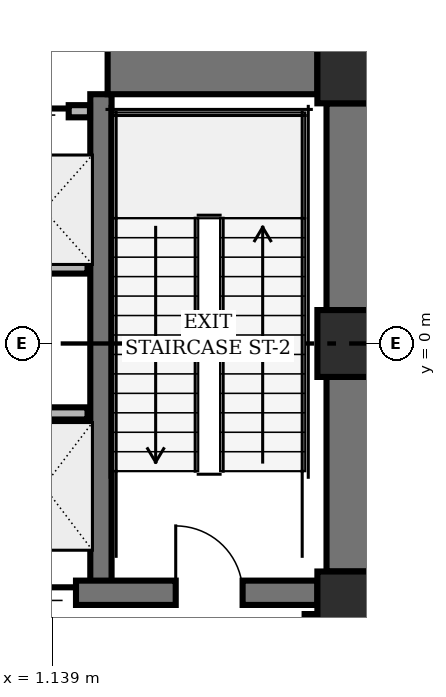
"""IFC4 building model, lengths in metres.
Left out: names, types, materials, properties, quantities, classifications, styles, units other than length and angle.
Written with IfcOpenShell. Run it as: python <this file> out.ifc"""

import sys

from ifc_helpers import new_model, si_unit, direction, frame, frame_2d, origin, origin_2d, place, context, subcontext, project, spatial, rectangle, hollow_rectangle, extrude, element, fill, save


model = new_model("IFC4")
c1 = context("Model", 3, precision=1e-05, world=origin(), true_north=direction((0.0, 1.0)))
c2 = subcontext(c1, "Body", "Model", "MODEL_VIEW")
j1 = project(units=[si_unit("LENGTHUNIT", "METRE"), si_unit("PLANEANGLEUNIT", "RADIAN")], contexts=[c1])
p1 = place(None, origin())
s1 = spatial("IfcSite", under=j1, at=p1, CompositionType="ELEMENT")
p2 = place(p1, origin())
s2 = spatial("IfcBuilding", under=s1, at=p2, CompositionType="ELEMENT")
p3 = place(p2, origin())
s3 = spatial("IfcBuildingStorey", under=s2, at=p3, CompositionType="ELEMENT", Elevation=0.0)
for number, where, z_axis, x_axis in (
    (1, (6.05, 4.5, 0.0), (0.0, 0.0, 1.0), (1.0, 0.0, 0.0)),
    (2, (6.05, 0.0, 0.0), (0.0, 0.0, 1.0), (1.0, 0.0, 0.0)),
    (3, (6.05, -4.3, 0.0), (0.0, 0.0, 1.0), (1.0, 0.0, 0.0)),
):
    element("IfcColumn", number, at=place(p3, frame(where, z_axis=z_axis, x_axis=x_axis)), inside=s3, PredefinedType="COLUMN", context=c2, shape_type="SweptSolid", body=[
        extrude(hollow_rectangle(XDim=1.1, YDim=1.1, WallThickness=0.07, InnerFilletRadius=0.02, OuterFilletRadius=0.04, at=origin_2d()), origin(), (0.0, 0.0, 1.0), 4.8),
    ])
p4 = place(p3, frame((6.05, 0.55, 0.0), z_axis=(0.0, 0.0, 1.0), x_axis=(0.0, 1.0, 0.0)))
e4 = element("IfcWall", 4, at=p4, inside=s3, PredefinedType="SHEAR", context=c2, shape_type="SweptSolid", body=[
    extrude(rectangle(XDim=3.4, YDim=0.8, at=frame_2d((1.7, 0.0))), origin(), (0.0, 0.0, 1.0), 4.498),
])
p5 = place(p3, frame((6.05, -3.75, 0.0), z_axis=(0.0, 0.0, 1.0), x_axis=(0.0, 1.0, 0.0)))
e5 = element("IfcWall", 5, at=p5, inside=s3, PredefinedType="SHEAR", context=c2, shape_type="SweptSolid", body=[
    extrude(rectangle(XDim=3.2, YDim=0.8, at=frame_2d((1.6, 0.0))), origin(), (0.0, 0.0, 1.0), 4.498),
])
p6 = place(p3, frame((1.94, -4.1, 0.0), z_axis=(0.0, 0.0, 1.0), x_axis=(0.0, 1.0, 0.0)))
e6 = element("IfcWall", 6, at=p6, inside=s3, PredefinedType="SHEAR", context=c2, shape_type="SweptSolid", body=[
    extrude(rectangle(XDim=8.2, YDim=0.35, at=frame_2d((4.1, 0.0))), origin(), (0.0, 0.0, 1.0), 4.498),
])
p7 = place(p3, frame((-5.5, -4.1, 0.0), z_axis=(0.0, 0.0, 1.0), x_axis=(1.0, 0.0, 0.0)))
e7 = element("IfcWall", 7, at=p7, inside=s3, PredefinedType="SHEAR", context=c2, shape_type="SweptSolid", body=[
    extrude(rectangle(XDim=11.0, YDim=0.4, at=frame_2d((5.5, 0.0))), origin(), (0.0, 0.0, 1.0), 4.498),
])
p8 = place(p7, frame((1.23, 0.0, 0.0)))
e8 = element("IfcOpeningElement", 8, at=p8, cuts=e7, PredefinedType="OPENING", context=c2, shape_type="SweptSolid", body=[
    extrude(rectangle(XDim=1.1, YDim=2.04, at=frame_2d((0.55, 1.02))), frame((0.0, 0.21, 0.0), z_axis=(0.0, -1.0, 0.0), x_axis=(1.0, 0.0, 0.0)), (0.0, 0.0, 1.0), 0.42),
])
p9 = place(p7, frame((8.67, 0.0, 0.0)))
e9 = element("IfcOpeningElement", 9, at=p9, cuts=e7, PredefinedType="OPENING", context=c2, shape_type="SweptSolid", body=[
    extrude(rectangle(XDim=1.1, YDim=2.04, at=frame_2d((0.55, 1.02))), frame((0.0, 0.21, 0.0), z_axis=(0.0, -1.0, 0.0), x_axis=(1.0, 0.0, 0.0)), (0.0, 0.0, 1.0), 0.42),
])
p10 = place(p7, frame((3.97, 0.0, 0.0)))
e10 = element("IfcOpeningElement", 10, at=p10, cuts=e7, PredefinedType="OPENING", context=c2, shape_type="SweptSolid", body=[
    extrude(rectangle(XDim=1.06, YDim=2.04, at=frame_2d((0.53, 1.02))), frame((0.0, 0.21, 0.0), z_axis=(0.0, -1.0, 0.0), x_axis=(1.0, 0.0, 0.0)), (0.0, 0.0, 1.0), 0.42),
])
p11 = place(p7, frame((5.97, 0.0, 0.0)))
e11 = element("IfcOpeningElement", 11, at=p11, cuts=e7, PredefinedType="OPENING", context=c2, shape_type="SweptSolid", body=[
    extrude(rectangle(XDim=1.06, YDim=2.04, at=frame_2d((0.53, 1.02))), frame((0.0, 0.21, 0.0), z_axis=(0.0, -1.0, 0.0), x_axis=(1.0, 0.0, 0.0)), (0.0, 0.0, 1.0), 0.42),
])
p12 = place(p3, frame((2.05, 4.5, 0.0), z_axis=(0.0, 0.0, 1.0), x_axis=(1.0, 0.0, 0.0)))
e12 = element("IfcWall", 12, at=p12, inside=s3, PredefinedType="SHEAR", context=c2, shape_type="SweptSolid", body=[
    extrude(rectangle(XDim=3.45, YDim=0.8, at=frame_2d((1.725, 0.0))), origin(), (0.0, 0.0, 1.0), 4.498),
])
p13 = place(p3, frame((-1.72, -1.15, 0.0), z_axis=(0.0, 0.0, 1.0), x_axis=(1.0, 0.0, 0.0)))
e13 = element("IfcWall", 13, at=p13, inside=s3, PredefinedType="PARTITIONING", context=c2, shape_type="SweptSolid", body=[
    extrude(rectangle(XDim=3.44, YDim=0.2, at=frame_2d((1.72, 0.0))), origin(), (0.0, 0.0, 1.0), 4.473),
])
p14 = place(p3, frame((5.4, -7.16, 0.0), z_axis=(0.0, 0.0, 1.0), x_axis=(0.0, 1.0, 0.0)))
e14 = element("IfcWall", 14, at=p14, inside=s3, PredefinedType="PARTITIONING", context=c2, shape_type="SweptSolid", body=[
    extrude(rectangle(XDim=2.71, YDim=0.22, at=frame_2d((1.355, 0.0))), origin(), (0.0, 0.0, 1.0), 4.473),
])
p15 = place(p3, frame((-1.72, 1.25, 0.0), z_axis=(0.0, 0.0, 1.0), x_axis=(1.0, 0.0, 0.0)))
e15 = element("IfcWall", 15, at=p15, inside=s3, PredefinedType="PARTITIONING", context=c2, shape_type="SweptSolid", body=[
    extrude(rectangle(XDim=3.44, YDim=0.2, at=frame_2d((1.72, 0.0))), origin(), (0.0, 0.0, 1.0), 4.473),
])
p16 = place(p3, frame((-1.76, 3.82, 0.0), z_axis=(0.0, 0.0, 1.0), x_axis=(1.0, 0.0, 0.0)))
e16 = element("IfcWall", 16, at=p16, inside=s3, PredefinedType="PARTITIONING", context=c2, shape_type="SweptSolid", body=[
    extrude(rectangle(XDim=3.52, YDim=0.2, at=frame_2d((1.76, 0.0))), origin(), (0.0, 0.0, 1.0), 4.473),
])
p17 = place(p16, frame((0.35, 0.0, 0.0)))
e17 = element("IfcOpeningElement", 17, at=p17, cuts=e16, PredefinedType="OPENING", context=c2, shape_type="SweptSolid", body=[
    extrude(rectangle(XDim=1.06, YDim=2.04, at=frame_2d((0.53, 1.02))), frame((0.0, 0.11, 0.0), z_axis=(0.0, -1.0, 0.0), x_axis=(1.0, 0.0, 0.0)), (0.0, 0.0, 1.0), 0.22),
])
p18 = place(p16, frame((2.11, 0.0, 0.0)))
e18 = element("IfcOpeningElement", 18, at=p18, cuts=e16, PredefinedType="OPENING", context=c2, shape_type="SweptSolid", body=[
    extrude(rectangle(XDim=1.06, YDim=2.04, at=frame_2d((0.53, 1.02))), frame((0.0, 0.11, 0.0), z_axis=(0.0, -1.0, 0.0), x_axis=(1.0, 0.0, 0.0)), (0.0, 0.0, 1.0), 0.22),
])
p19 = place(p9, origin())
e19 = element("IfcDoor", 19, at=p19, inside=s3, OperationType="SINGLE_SWING_LEFT", PredefinedType="DOOR", context=c2, shape_type="SweptSolid", body=[
    extrude(rectangle(XDim=1.1, YDim=2.04, at=frame_2d((0.55, 1.02))), frame((0.0, 0.025, 0.0), z_axis=(0.0, -1.0, 0.0), x_axis=(1.0, 0.0, 0.0)), (0.0, 0.0, 1.0), 0.05),
])
fill(e9, e19)
p20 = place(p11, origin())
e20 = element("IfcDoor", 20, at=p20, inside=s3, OperationType="SLIDING_TO_RIGHT", PredefinedType="DOOR", context=c2, shape_type="SweptSolid", body=[
    extrude(rectangle(XDim=1.06, YDim=2.04, at=frame_2d((0.53, 1.02))), frame((0.0, 0.025, 0.0), z_axis=(0.0, -1.0, 0.0), x_axis=(1.0, 0.0, 0.0)), (0.0, 0.0, 1.0), 0.05),
])
fill(e11, e20)
p21 = place(p18, origin())
e21 = element("IfcDoor", 21, at=p21, inside=s3, OperationType="SLIDING_TO_RIGHT", PredefinedType="DOOR", context=c2, shape_type="SweptSolid", body=[
    extrude(rectangle(XDim=1.06, YDim=2.04, at=frame_2d((0.53, 1.02))), frame((0.0, 0.025, 0.0), z_axis=(0.0, -1.0, 0.0), x_axis=(1.0, 0.0, 0.0)), (0.0, 0.0, 1.0), 0.05),
])
fill(e18, e21)
save(model, sys.argv[1])
